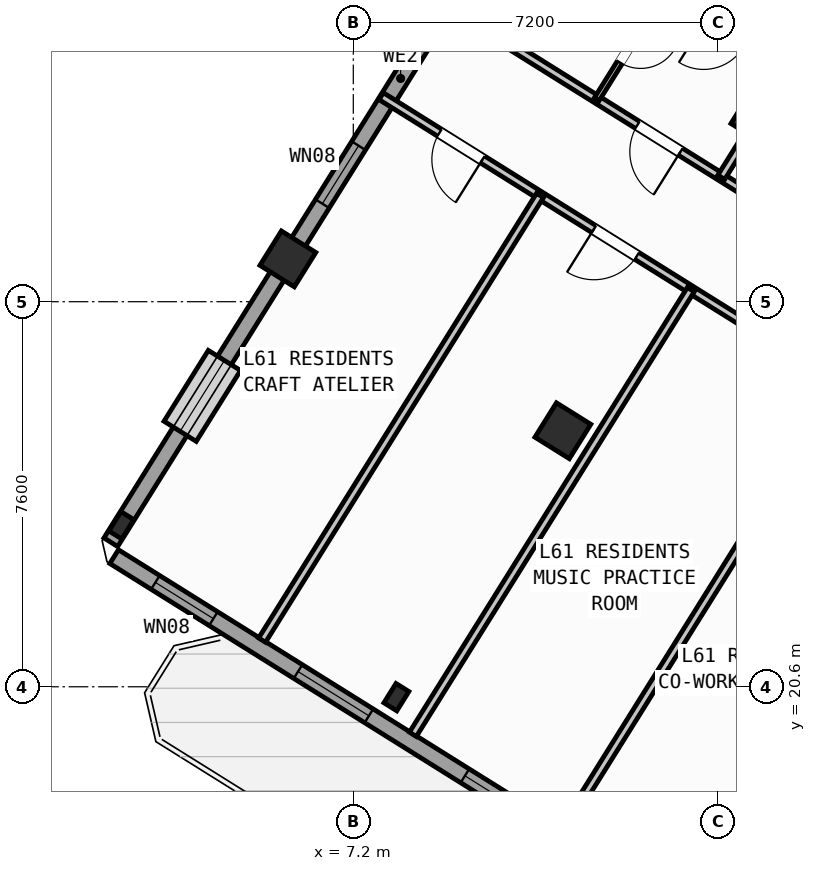
"""IFC4 building model, lengths in metres.
Left out: names, types, materials, properties, quantities, classifications, styles, units other than length and angle.
Written with IfcOpenShell. Run it as: python <this file> out.ifc"""

import sys

from ifc_helpers import new_model, si_unit, direction, frame, frame_2d, origin, origin_2d, place, context, subcontext, project, spatial, rectangle, hollow_rectangle, i_section, extrude, source, transform, mapped, element, fill, save


model = new_model("IFC4")
c1 = context("Model", 3, precision=1e-05, world=origin(), true_north=direction((0.0, 1.0)))
c2 = subcontext(c1, "Body", "Model", "MODEL_VIEW")
j1 = project(units=[si_unit("LENGTHUNIT", "METRE"), si_unit("PLANEANGLEUNIT", "RADIAN")], contexts=[c1])
p1 = place(None, origin())
s1 = spatial("IfcSite", under=j1, at=p1, CompositionType="ELEMENT")
p2 = place(p1, origin())
s2 = spatial("IfcBuilding", under=s1, at=p2, CompositionType="ELEMENT")
p3 = place(p2, frame((0.0, 0.0, 242.1)))
s3 = spatial("IfcBuildingStorey", under=s2, at=p3, CompositionType="ELEMENT", Elevation=242.1)
m1 = source(origin(), c2, "Body", "SweptSolid", [
    extrude(hollow_rectangle(XDim=0.8, YDim=0.8, WallThickness=0.032, at=origin_2d()), origin(), (0.0, 0.0, 1.0), 3.6),
])
for number, where, z_axis, x_axis in (
    (1, (15.205, 31.844, 0.0), (0.0, 0.0, 1.0), (-0.848, 0.53, 0.0)),
    (2, (11.336, 25.653, 0.0), (0.0, 0.0, 1.0), (-0.848, 0.53, 0.0)),
):
    element("IfcColumn", number, at=place(p3, frame(where, z_axis=z_axis, x_axis=x_axis)), inside=s3, PredefinedType="COLUMN", context=c2, shape_type="MappedRepresentation", body=[
        mapped(m1, transform((0.0, 0.0, 0.0), scale=1.0)),
    ])
m2 = source(origin(), c2, "Body", "SweptSolid", [
    extrude(i_section(OverallWidth=0.3, OverallDepth=0.45, WebThickness=0.014, FlangeThickness=0.026, at=origin_2d()), origin(), (0.0, 0.0, 1.0), 3.6),
])
p4 = place(p3, frame((8.051, 20.395, 0.0), z_axis=(0.0, 0.0, 1.0), x_axis=(-0.848048096156, 0.529919264233, 0.0)))
e3 = element("IfcColumn", 3, at=p4, inside=s3, PredefinedType="COLUMN", context=c2, shape_type="MappedRepresentation", body=[
    mapped(m2, transform((0.0, 0.0, 0.0), scale=1.0)),
])
p5 = place(p3, frame((5.909, 29.044, 0.0), z_axis=(0.0, 0.0, 1.0), x_axis=(-0.848048096156, 0.529919264233, 0.0)))
e4 = element("IfcColumn", 4, at=p5, inside=s3, PredefinedType="COLUMN", context=c2, shape_type="MappedRepresentation", body=[
    mapped(m1, transform((0.0, 0.0, 0.0), scale=1.0)),
])
p6 = place(p3, frame((2.623, 23.786, 0.0), z_axis=(0.0, 0.0, 1.0), x_axis=(-0.848048096156, 0.529919264233, 0.0)))
e5 = element("IfcColumn", 5, at=p6, inside=s3, PredefinedType="COLUMN", context=c2, shape_type="MappedRepresentation", body=[
    mapped(m2, transform((0.0, 0.0, 0.0), scale=1.0)),
])
p7 = place(p3, frame((29.268, 6.429, 0.0), z_axis=(0.0, 0.0, 1.0), x_axis=(-0.848049971435, 0.529916263149, 0.0)))
e6 = element("IfcWall", 6, at=p7, inside=s3, PredefinedType="STANDARD", context=c2, shape_type="SweptSolid", body=[
    extrude(rectangle(XDim=31.588, YDim=0.32, at=frame_2d((15.794, 0.0))), origin(), (0.0, 0.0, 1.0), 3.32),
])
p8 = place(p7, frame((16.235, 0.0, 0.0)))
e7 = element("IfcOpeningElement", 7, at=p8, cuts=e6, PredefinedType="OPENING", context=c2, shape_type="SweptSolid", body=[
    extrude(rectangle(XDim=1.2, YDim=2.15, at=frame_2d((0.6, 1.075))), frame((0.0, 0.17, 0.0), z_axis=(0.0, -1.0, 0.0), x_axis=(1.0, 0.0, 0.0)), (0.0, 0.0, 1.0), 0.34),
])
p9 = place(p7, frame((3.859, 0.0, 0.9)))
e8 = element("IfcOpeningElement", 8, at=p9, cuts=e6, PredefinedType="OPENING", context=c2, shape_type="SweptSolid", body=[
    extrude(rectangle(XDim=1.65, YDim=1.45, at=frame_2d((0.825, 0.725))), frame((0.0, 0.17, 0.0), z_axis=(0.0, -1.0, 0.0), x_axis=(1.0, 0.0, 0.0)), (0.0, 0.0, 1.0), 0.34),
])
p10 = place(p7, frame((10.519, 0.0, 0.9)))
e9 = element("IfcOpeningElement", 9, at=p10, cuts=e6, PredefinedType="OPENING", context=c2, shape_type="SweptSolid", body=[
    extrude(rectangle(XDim=1.65, YDim=1.45, at=frame_2d((0.825, 0.725))), frame((0.0, 0.17, 0.0), z_axis=(0.0, -1.0, 0.0), x_axis=(1.0, 0.0, 0.0)), (0.0, 0.0, 1.0), 0.34),
])
p11 = place(p7, frame((19.182, 0.0, 1.0)))
e10 = element("IfcOpeningElement", 10, at=p11, cuts=e6, PredefinedType="OPENING", context=c2, shape_type="SweptSolid", body=[
    extrude(rectangle(XDim=0.9, YDim=1.25, at=frame_2d((0.45, 0.625))), frame((0.0, 0.17, 0.0), z_axis=(0.0, -1.0, 0.0), x_axis=(1.0, 0.0, 0.0)), (0.0, 0.0, 1.0), 0.34),
])
p12 = place(p7, frame((22.524, 0.0, 1.0)))
e11 = element("IfcOpeningElement", 11, at=p12, cuts=e6, PredefinedType="OPENING", context=c2, shape_type="SweptSolid", body=[
    extrude(rectangle(XDim=0.9, YDim=1.25, at=frame_2d((0.45, 0.625))), frame((0.0, 0.17, 0.0), z_axis=(0.0, -1.0, 0.0), x_axis=(1.0, 0.0, 0.0)), (0.0, 0.0, 1.0), 0.34),
])
p13 = place(p7, frame((25.658, 0.0, 0.9)))
e12 = element("IfcOpeningElement", 12, at=p13, cuts=e6, PredefinedType="OPENING", context=c2, shape_type="SweptSolid", body=[
    extrude(rectangle(XDim=1.65, YDim=1.45, at=frame_2d((0.825, 0.725))), frame((0.0, 0.17, 0.0), z_axis=(0.0, -1.0, 0.0), x_axis=(1.0, 0.0, 0.0)), (0.0, 0.0, 1.0), 0.34),
])
p14 = place(p7, frame((29.278, 0.0, 0.9)))
e13 = element("IfcOpeningElement", 13, at=p14, cuts=e6, PredefinedType="OPENING", context=c2, shape_type="SweptSolid", body=[
    extrude(rectangle(XDim=1.35, YDim=1.45, at=frame_2d((0.675, 0.725))), frame((0.0, 0.17, 0.0), z_axis=(0.0, -1.0, 0.0), x_axis=(1.0, 0.0, 0.0)), (0.0, 0.0, 1.0), 0.34),
])
p15 = place(p3, frame((2.415, 23.452, 0.0), z_axis=(0.0, 0.0, 1.0), x_axis=(0.52991049553, 0.848053575387, 0.0)))
e14 = element("IfcWall", 14, at=p15, inside=s3, PredefinedType="STANDARD", context=c2, shape_type="SweptSolid", body=[
    extrude(rectangle(XDim=21.587, YDim=0.32, at=frame_2d((10.794, 0.0))), origin(), (0.0, 0.0, 1.0), 2.845),
])
p16 = place(p15, frame((2.581, 0.0, 0.9)))
e15 = element("IfcOpeningElement", 15, at=p16, cuts=e14, PredefinedType="OPENING", context=c2, shape_type="SweptSolid", body=[
    extrude(rectangle(XDim=1.65, YDim=1.45, at=frame_2d((0.825, 0.725))), frame((0.0, 0.17, 0.0), z_axis=(0.0, -1.0, 0.0), x_axis=(1.0, 0.0, 0.0)), (0.0, 0.0, 1.0), 0.34),
])
p17 = place(p15, frame((7.879, 0.0, 0.9)))
e16 = element("IfcOpeningElement", 16, at=p17, cuts=e14, PredefinedType="OPENING", context=c2, shape_type="SweptSolid", body=[
    extrude(rectangle(XDim=1.35, YDim=1.45, at=frame_2d((0.675, 0.725))), frame((0.0, 0.17, 0.0), z_axis=(0.0, -1.0, 0.0), x_axis=(1.0, 0.0, 0.0)), (0.0, 0.0, 1.0), 0.34),
])
p18 = place(p15, frame((16.954, 0.0, 0.95)))
e17 = element("IfcOpeningElement", 17, at=p18, cuts=e14, PredefinedType="OPENING", context=c2, shape_type="SweptSolid", body=[
    extrude(rectangle(XDim=1.95, YDim=1.35, at=frame_2d((0.975, 0.675))), frame((0.0, 0.17, 0.0), z_axis=(0.0, -1.0, 0.0), x_axis=(1.0, 0.0, 0.0)), (0.0, 0.0, 1.0), 0.34),
])
p19 = place(p3, frame((14.138, 41.825, 0.0), z_axis=(0.0, 0.0, 1.0), x_axis=(0.848046498049, -0.529921821731, 0.0)))
e18 = element("IfcWall", 18, at=p19, inside=s3, PredefinedType="STANDARD", context=c2, shape_type="SweptSolid", body=[
    extrude(rectangle(XDim=31.588, YDim=0.32, at=frame_2d((15.794, 0.0))), origin(), (0.0, 0.0, 1.0), 3.32),
])
p20 = place(p19, frame((9.712, 0.0, 0.0)))
e19 = element("IfcOpeningElement", 19, at=p20, cuts=e18, PredefinedType="OPENING", context=c2, shape_type="SweptSolid", body=[
    extrude(rectangle(XDim=1.05, YDim=2.15, at=frame_2d((0.525, 1.075))), frame((0.0, 0.17, 0.0), z_axis=(0.0, -1.0, 0.0), x_axis=(1.0, 0.0, 0.0)), (0.0, 0.0, 1.0), 0.34),
])
p21 = place(p19, frame((0.841, 0.0, 0.9)))
e20 = element("IfcOpeningElement", 20, at=p21, cuts=e18, PredefinedType="OPENING", context=c2, shape_type="SweptSolid", body=[
    extrude(rectangle(XDim=1.65, YDim=1.45, at=frame_2d((0.825, 0.725))), frame((0.0, 0.17, 0.0), z_axis=(0.0, -1.0, 0.0), x_axis=(1.0, 0.0, 0.0)), (0.0, 0.0, 1.0), 0.34),
])
p22 = place(p19, frame((4.171, 0.0, 1.0)))
e21 = element("IfcOpeningElement", 21, at=p22, cuts=e18, PredefinedType="OPENING", context=c2, shape_type="SweptSolid", body=[
    extrude(rectangle(XDim=0.9, YDim=1.25, at=frame_2d((0.45, 0.625))), frame((0.0, 0.17, 0.0), z_axis=(0.0, -1.0, 0.0), x_axis=(1.0, 0.0, 0.0)), (0.0, 0.0, 1.0), 0.34),
])
p23 = place(p19, frame((13.624, 0.0, 0.95)))
e22 = element("IfcOpeningElement", 22, at=p23, cuts=e18, PredefinedType="OPENING", context=c2, shape_type="SweptSolid", body=[
    extrude(rectangle(XDim=1.95, YDim=1.35, at=frame_2d((0.975, 0.675))), frame((0.0, 0.17, 0.0), z_axis=(0.0, -1.0, 0.0), x_axis=(1.0, 0.0, 0.0)), (0.0, 0.0, 1.0), 0.34),
])
p24 = place(p19, frame((17.129, 0.0, 1.0)))
e23 = element("IfcOpeningElement", 23, at=p24, cuts=e18, PredefinedType="OPENING", context=c2, shape_type="SweptSolid", body=[
    extrude(rectangle(XDim=0.9, YDim=1.25, at=frame_2d((0.45, 0.625))), frame((0.0, 0.17, 0.0), z_axis=(0.0, -1.0, 0.0), x_axis=(1.0, 0.0, 0.0)), (0.0, 0.0, 1.0), 0.34),
])
p25 = place(p19, frame((21.744, 0.0, 0.9)))
e24 = element("IfcOpeningElement", 24, at=p25, cuts=e18, PredefinedType="OPENING", context=c2, shape_type="SweptSolid", body=[
    extrude(rectangle(XDim=1.65, YDim=1.45, at=frame_2d((0.825, 0.725))), frame((0.0, 0.17, 0.0), z_axis=(0.0, -1.0, 0.0), x_axis=(1.0, 0.0, 0.0)), (0.0, 0.0, 1.0), 0.34),
])
p26 = place(p19, frame((27.394, 0.0, 0.9)))
e25 = element("IfcOpeningElement", 25, at=p26, cuts=e18, PredefinedType="OPENING", context=c2, shape_type="SweptSolid", body=[
    extrude(rectangle(XDim=1.65, YDim=1.45, at=frame_2d((0.825, 0.725))), frame((0.0, 0.17, 0.0), z_axis=(0.0, -1.0, 0.0), x_axis=(1.0, 0.0, 0.0)), (0.0, 0.0, 1.0), 0.34),
])
p27 = place(p3, frame((23.104, 25.256, 0.0), z_axis=(0.0, 0.0, 1.0), x_axis=(-0.848041752158, 0.529929416617, 0.0)))
e26 = element("IfcWall", 26, at=p27, inside=s3, PredefinedType="PARTITIONING", context=c2, shape_type="SweptSolid", body=[
    extrude(rectangle(XDim=16.73, YDim=0.16, at=frame_2d((8.365, 0.0))), origin(), (0.0, 0.0, 1.0), 3.31),
])
p28 = place(p27, frame((1.395, 0.0, 0.0)))
e27 = element("IfcOpeningElement", 27, at=p28, cuts=e26, PredefinedType="OPENING", context=c2, shape_type="SweptSolid", body=[
    extrude(rectangle(XDim=1.0, YDim=2.1, at=frame_2d((0.5, 1.05))), frame((0.0, 0.09, 0.0), z_axis=(0.0, -1.0, 0.0), x_axis=(1.0, 0.0, 0.0)), (0.0, 0.0, 1.0), 0.18),
])
p29 = place(p27, frame((7.82, 0.0, 0.0)))
e28 = element("IfcOpeningElement", 28, at=p29, cuts=e26, PredefinedType="OPENING", context=c2, shape_type="SweptSolid", body=[
    extrude(rectangle(XDim=1.0, YDim=2.1, at=frame_2d((0.5, 1.05))), frame((0.0, 0.09, 0.0), z_axis=(0.0, -1.0, 0.0), x_axis=(1.0, 0.0, 0.0)), (0.0, 0.0, 1.0), 0.18),
])
p30 = place(p27, frame((11.14, 0.0, 0.0)))
e29 = element("IfcOpeningElement", 29, at=p30, cuts=e26, PredefinedType="OPENING", context=c2, shape_type="SweptSolid", body=[
    extrude(rectangle(XDim=1.0, YDim=2.1, at=frame_2d((0.5, 1.05))), frame((0.0, 0.09, 0.0), z_axis=(0.0, -1.0, 0.0), x_axis=(1.0, 0.0, 0.0)), (0.0, 0.0, 1.0), 0.18),
])
p31 = place(p3, frame((21.938, 23.391, 0.0), z_axis=(0.0, 0.0, 1.0), x_axis=(-0.848045850158, 0.529922858565, 0.0)))
e30 = element("IfcWall", 30, at=p31, inside=s3, PredefinedType="PARTITIONING", context=c2, shape_type="SweptSolid", body=[
    extrude(rectangle(XDim=16.73, YDim=0.16, at=frame_2d((8.365, 0.0))), origin(), (0.0, 0.0, 1.0), 3.31),
])
p32 = place(p31, frame((0.92, 0.0, 0.0)))
e31 = element("IfcOpeningElement", 31, at=p32, cuts=e30, PredefinedType="OPENING", context=c2, shape_type="SweptSolid", body=[
    extrude(rectangle(XDim=1.0, YDim=2.1, at=frame_2d((0.5, 1.05))), frame((0.0, 0.09, 0.0), z_axis=(0.0, -1.0, 0.0), x_axis=(1.0, 0.0, 0.0)), (0.0, 0.0, 1.0), 0.18),
])
p33 = place(p31, frame((3.928, 0.0, 0.0)))
e32 = element("IfcOpeningElement", 32, at=p33, cuts=e30, PredefinedType="OPENING", context=c2, shape_type="SweptSolid", body=[
    extrude(rectangle(XDim=1.0, YDim=2.1, at=frame_2d((0.5, 1.05))), frame((0.0, 0.09, 0.0), z_axis=(0.0, -1.0, 0.0), x_axis=(1.0, 0.0, 0.0)), (0.0, 0.0, 1.0), 0.18),
])
p34 = place(p31, frame((7.271, 0.0, 0.0)))
e33 = element("IfcOpeningElement", 33, at=p34, cuts=e30, PredefinedType="OPENING", context=c2, shape_type="SweptSolid", body=[
    extrude(rectangle(XDim=1.0, YDim=2.1, at=frame_2d((0.5, 1.05))), frame((0.0, 0.09, 0.0), z_axis=(0.0, -1.0, 0.0), x_axis=(1.0, 0.0, 0.0)), (0.0, 0.0, 1.0), 0.18),
])
p35 = place(p31, frame((10.78, 0.0, 0.0)))
e34 = element("IfcOpeningElement", 34, at=p35, cuts=e30, PredefinedType="OPENING", context=c2, shape_type="SweptSolid", body=[
    extrude(rectangle(XDim=1.0, YDim=2.1, at=frame_2d((0.5, 1.05))), frame((0.0, 0.09, 0.0), z_axis=(0.0, -1.0, 0.0), x_axis=(1.0, 0.0, 0.0)), (0.0, 0.0, 1.0), 0.18),
])
p36 = place(p31, frame((14.372, 0.0, 0.0)))
e35 = element("IfcOpeningElement", 35, at=p36, cuts=e30, PredefinedType="OPENING", context=c2, shape_type="SweptSolid", body=[
    extrude(rectangle(XDim=1.0, YDim=2.1, at=frame_2d((0.5, 1.05))), frame((0.0, 0.09, 0.0), z_axis=(0.0, -1.0, 0.0), x_axis=(1.0, 0.0, 0.0)), (0.0, 0.0, 1.0), 0.18),
])
p37 = place(p3, frame((19.529, 24.896, 0.0), z_axis=(0.0, 0.0, 1.0), x_axis=(-0.529914125013, -0.848051307476, 0.0)))
e36 = element("IfcWall", 36, at=p37, inside=s3, PredefinedType="PARTITIONING", context=c2, shape_type="SweptSolid", body=[
    extrude(rectangle(XDim=10.35, YDim=0.16, at=frame_2d((5.175, 0.0))), origin(), (0.0, 0.0, 1.0), 3.31),
])
p38 = place(p3, frame((16.837, 26.579, 0.0), z_axis=(0.0, 0.0, 1.0), x_axis=(-0.529941690036, -0.848034082547, 0.0)))
e37 = element("IfcWall", 37, at=p38, inside=s3, PredefinedType="PARTITIONING", context=c2, shape_type="SweptSolid", body=[
    extrude(rectangle(XDim=10.35, YDim=0.16, at=frame_2d((5.175, 0.0))), origin(), (0.0, 0.0, 1.0), 2.935),
])
p39 = place(p3, frame((13.861, 28.438, 0.0), z_axis=(0.0, 0.0, 1.0), x_axis=(-0.529931089283, -0.848040706931, 0.0)))
e38 = element("IfcWall", 38, at=p39, inside=s3, PredefinedType="PARTITIONING", context=c2, shape_type="SweptSolid", body=[
    extrude(rectangle(XDim=10.35, YDim=0.16, at=frame_2d((5.175, 0.0))), origin(), (0.0, 0.0, 1.0), 3.31),
])
p40 = place(p3, frame((10.885, 30.298, 0.0), z_axis=(0.0, 0.0, 1.0), x_axis=(-0.529924725692, -0.848044683434, 0.0)))
e39 = element("IfcWall", 39, at=p40, inside=s3, PredefinedType="PARTITIONING", context=c2, shape_type="SweptSolid", body=[
    extrude(rectangle(XDim=10.35, YDim=0.16, at=frame_2d((5.175, 0.0))), origin(), (0.0, 0.0, 1.0), 3.31),
])
p41 = place(p3, frame((14.986, 31.494, 0.0), z_axis=(0.0, 0.0, 1.0), x_axis=(-0.529821225456, -0.848109349704, 0.0)))
e40 = element("IfcWall", 40, at=p41, inside=s3, PredefinedType="PARTITIONING", context=c2, shape_type="SweptSolid", body=[
    extrude(rectangle(XDim=0.988, YDim=0.16, at=frame_2d((0.494, 0.0))), origin(), (0.0, 0.0, 1.0), 2.845),
])
p42 = place(p3, frame((16.995, 40.182, 0.0), z_axis=(0.0, 0.0, 1.0), x_axis=(-0.529931378574, -0.848040526156, 0.0)))
e41 = element("IfcWall", 41, at=p42, inside=s3, PredefinedType="PARTITIONING", context=c2, shape_type="SweptSolid", body=[
    extrude(rectangle(XDim=9.42, YDim=0.11, at=frame_2d((4.71, 0.0))), origin(), (0.0, 0.0, 1.0), 3.31),
])
p43 = place(p42, frame((7.78, 0.0, 0.0)))
e42 = element("IfcOpeningElement", 42, at=p43, cuts=e41, PredefinedType="OPENING", context=c2, shape_type="SweptSolid", body=[
    extrude(rectangle(XDim=0.78, YDim=2.05, at=frame_2d((0.39, 1.025))), frame((0.0, 0.065, 0.0), z_axis=(0.0, -1.0, 0.0), x_axis=(1.0, 0.0, 0.0)), (0.0, 0.0, 1.0), 0.13),
])
p44 = place(p42, frame((3.05, 0.0, 0.0)))
e43 = element("IfcOpeningElement", 43, at=p44, cuts=e41, PredefinedType="OPENING", context=c2, shape_type="SweptSolid", body=[
    extrude(rectangle(XDim=0.92, YDim=2.08, at=frame_2d((0.46, 1.04))), frame((0.0, 0.065, 0.0), z_axis=(0.0, -1.0, 0.0), x_axis=(1.0, 0.0, 0.0)), (0.0, 0.0, 1.0), 0.13),
])
p45 = place(p3, frame((15.734, 32.692, 0.0), z_axis=(0.0, 0.0, 1.0), x_axis=(-0.848059786386, 0.529900555496, 0.0)))
e44 = element("IfcWall", 44, at=p45, inside=s3, PredefinedType="PLUMBINGWALL", context=c2, shape_type="SweptSolid", body=[
    extrude(rectangle(XDim=2.9, YDim=0.14, at=frame_2d((1.45, 0.0))), origin(), (0.0, 0.0, 1.0), 3.31),
])
p46 = place(p45, frame((0.99, 0.0, 0.0)))
e45 = element("IfcOpeningElement", 45, at=p46, cuts=e44, PredefinedType="OPENING", context=c2, shape_type="SweptSolid", body=[
    extrude(rectangle(XDim=0.92, YDim=2.08, at=frame_2d((0.46, 1.04))), frame((0.0, 0.08, 0.0), z_axis=(0.0, -1.0, 0.0), x_axis=(1.0, 0.0, 0.0)), (0.0, 0.0, 1.0), 0.16),
])
m3 = source(origin(), c2, "Body", "SweptSolid", [
    extrude(rectangle(XDim=0.9, YDim=1.25, at=frame_2d((0.45, 0.625))), frame((0.0, 0.03, 0.0), z_axis=(0.0, -1.0, 0.0), x_axis=(1.0, 0.0, 0.0)), (0.0, 0.0, 1.0), 0.06),
])
p47 = place(p12, origin())
e46 = element("IfcWindow", 46, at=p47, inside=s3, PartitioningType="SINGLE_PANEL", PredefinedType="WINDOW", context=c2, shape_type="MappedRepresentation", body=[
    mapped(m3, transform((0.0, 0.0, 0.0), scale=1.0)),
])
fill(e11, e46)
m4 = source(origin(), c2, "Body", "SweptSolid", [
    extrude(rectangle(XDim=1.65, YDim=1.45, at=frame_2d((0.825, 0.725))), frame((0.0, 0.03, 0.0), z_axis=(0.0, -1.0, 0.0), x_axis=(1.0, 0.0, 0.0)), (0.0, 0.0, 1.0), 0.06),
])
p48 = place(p13, origin())
e47 = element("IfcWindow", 47, at=p48, inside=s3, PartitioningType="SINGLE_PANEL", PredefinedType="WINDOW", context=c2, shape_type="MappedRepresentation", body=[
    mapped(m4, transform((0.0, 0.0, 0.0), scale=1.0)),
])
fill(e12, e47)
m5 = source(origin(), c2, "Body", "SweptSolid", [
    extrude(rectangle(XDim=1.35, YDim=1.45, at=frame_2d((0.675, 0.725))), frame((0.0, 0.03, 0.0), z_axis=(0.0, -1.0, 0.0), x_axis=(1.0, 0.0, 0.0)), (0.0, 0.0, 1.0), 0.06),
])
p49 = place(p14, origin())
e48 = element("IfcWindow", 48, at=p49, inside=s3, PartitioningType="SINGLE_PANEL", PredefinedType="WINDOW", context=c2, shape_type="MappedRepresentation", body=[
    mapped(m5, transform((0.0, 0.0, 0.0), scale=1.0)),
])
fill(e13, e48)
p50 = place(p16, origin())
e49 = element("IfcWindow", 49, at=p50, inside=s3, PartitioningType="SINGLE_PANEL", PredefinedType="WINDOW", context=c2, shape_type="MappedRepresentation", body=[
    mapped(m4, transform((0.0, 0.0, 0.0), scale=1.0)),
])
fill(e15, e49)
p51 = place(p17, origin())
e50 = element("IfcWindow", 50, at=p51, inside=s3, PartitioningType="SINGLE_PANEL", PredefinedType="WINDOW", context=c2, shape_type="MappedRepresentation", body=[
    mapped(m5, transform((0.0, 0.0, 0.0), scale=1.0)),
])
fill(e16, e50)
m6 = source(origin(), c2, "Body", "SweptSolid", [
    extrude(rectangle(XDim=1.0, YDim=2.1, at=frame_2d((0.5, 1.05))), frame((0.0, 0.025, 0.0), z_axis=(0.0, -1.0, 0.0), x_axis=(1.0, 0.0, 0.0)), (0.0, 0.0, 1.0), 0.05),
])
p52 = place(p35, origin())
e51 = element("IfcDoor", 51, at=p52, inside=s3, OperationType="SINGLE_SWING_RIGHT", PredefinedType="DOOR", context=c2, shape_type="MappedRepresentation", body=[
    mapped(m6, transform((0.0, 0.0, 0.0), scale=1.0)),
])
fill(e34, e51)
p53 = place(p36, origin())
e52 = element("IfcDoor", 52, at=p53, inside=s3, OperationType="SINGLE_SWING_LEFT", PredefinedType="DOOR", context=c2, shape_type="MappedRepresentation", body=[
    mapped(m6, transform((0.0, 0.0, 0.0), scale=1.0)),
])
fill(e35, e52)
p54 = place(p30, origin())
e53 = element("IfcDoor", 53, at=p54, inside=s3, OperationType="SINGLE_SWING_LEFT", PredefinedType="DOOR", context=c2, shape_type="MappedRepresentation", body=[
    mapped(m6, transform((0.0, 0.0, 0.0), scale=1.0)),
])
fill(e29, e53)
m7 = source(origin(), c2, "Body", "SweptSolid", [
    extrude(rectangle(XDim=0.78, YDim=2.05, at=frame_2d((0.39, 1.025))), frame((0.0, 0.025, 0.0), z_axis=(0.0, -1.0, 0.0), x_axis=(1.0, 0.0, 0.0)), (0.0, 0.0, 1.0), 0.05),
])
p55 = place(p43, origin())
e54 = element("IfcDoor", 54, at=p55, inside=s3, OperationType="SINGLE_SWING_LEFT", PredefinedType="DOOR", context=c2, shape_type="MappedRepresentation", body=[
    mapped(m7, transform((0.0, 0.0, 0.0), scale=1.0)),
])
fill(e42, e54)
save(model, sys.argv[1])
